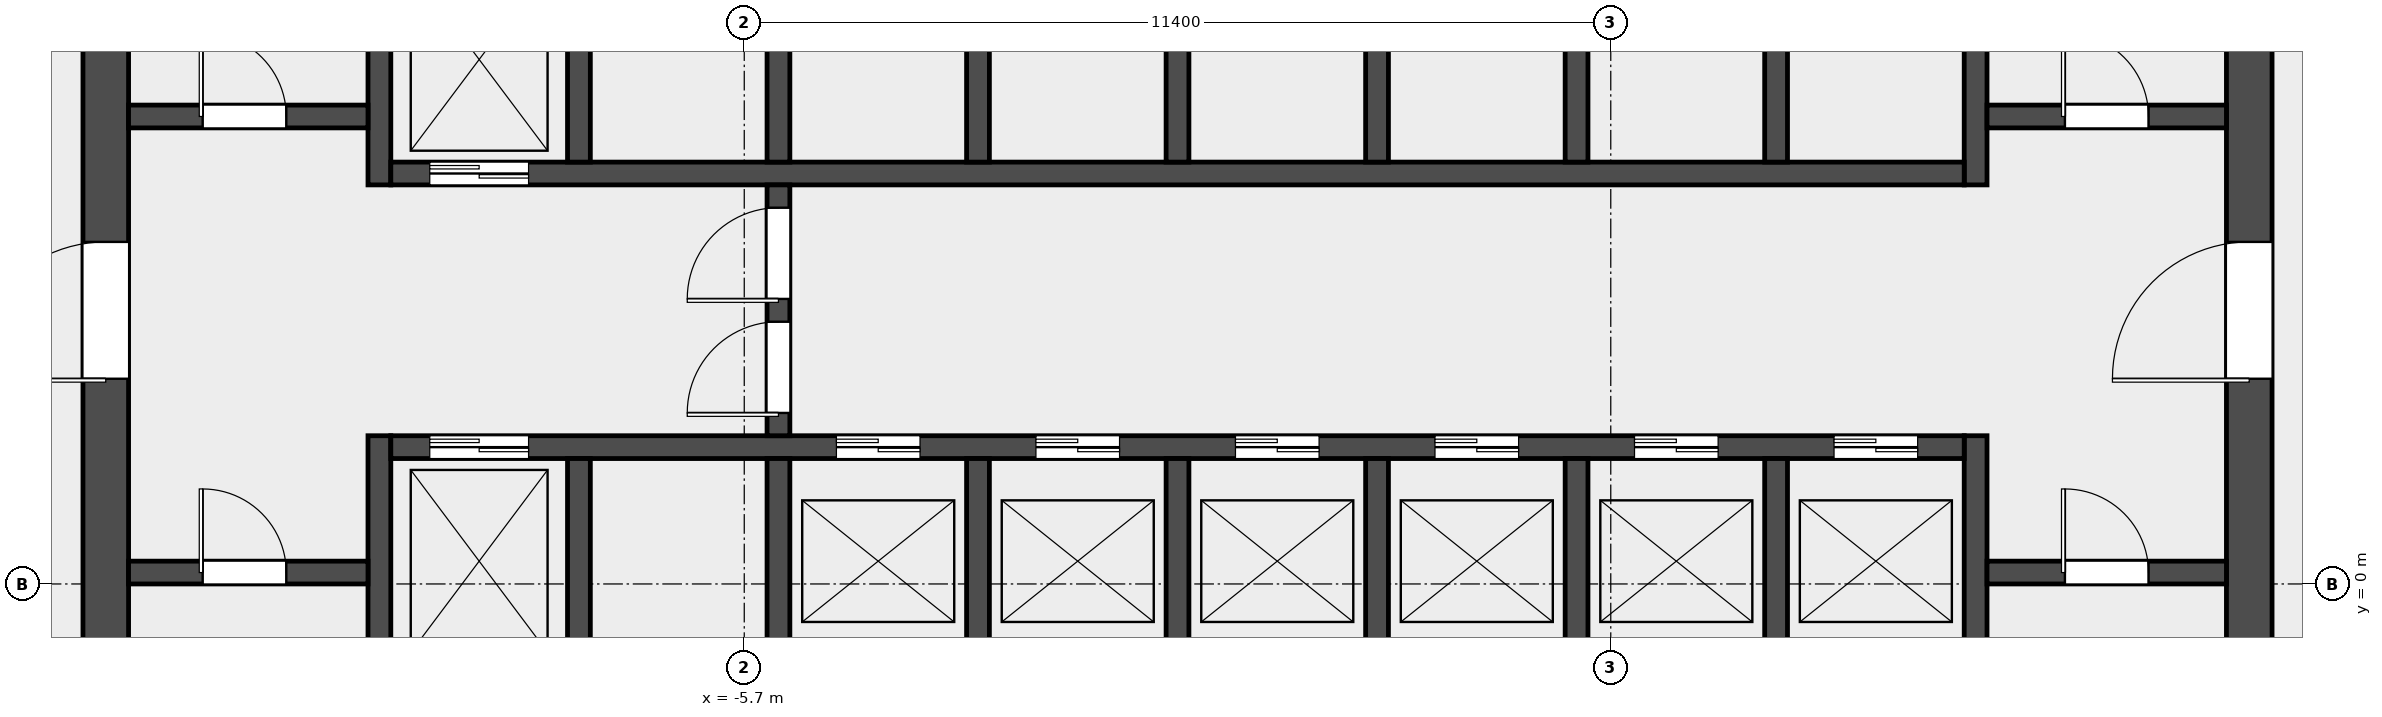
"""IFC4 building model, lengths in metres.
Left out: names, types, materials, properties, quantities, classifications, styles, units other than length and angle.
Written with IfcOpenShell. Run it as: python <this file> out.ifc"""

import sys

from ifc_helpers import new_model, si_unit, direction, frame, frame_2d, origin, place, context, subcontext, project, spatial, rectangle, extrude, element, fill, save


model = new_model("IFC4")
c1 = context("Model", 3, precision=1e-05, world=origin(), true_north=direction((0.0, 1.0)))
c2 = subcontext(c1, "Body", "Model", "MODEL_VIEW")
j1 = project(units=[si_unit("LENGTHUNIT", "METRE"), si_unit("PLANEANGLEUNIT", "RADIAN")], contexts=[c1])
p1 = place(None, origin())
s1 = spatial("IfcSite", under=j1, at=p1, CompositionType="ELEMENT")
p2 = place(p1, origin())
s2 = spatial("IfcBuilding", under=s1, at=p2, CompositionType="ELEMENT")
p3 = place(p2, frame((0.0, 0.0, 99.1)))
s3 = spatial("IfcBuildingStorey", under=s2, at=p3, CompositionType="ELEMENT", Elevation=99.1)
p4 = place(p3, frame((-14.1, -6.6, 0.0), z_axis=(0.0, 0.0, 1.0), x_axis=(0.0, 1.0, 0.0)))
e1 = element("IfcWall", 1, at=p4, inside=s3, PredefinedType="SHEAR", context=c2, shape_type="SweptSolid", body=[
    extrude(rectangle(XDim=19.5, YDim=0.6, at=frame_2d((9.75, 0.0))), origin(), (0.0, 0.0, 1.0), 4.2),
])
p5 = place(p4, frame((9.3, 0.0, 0.0)))
e2 = element("IfcOpeningElement", 2, at=p5, cuts=e1, PredefinedType="OPENING", context=c2, shape_type="SweptSolid", body=[
    extrude(rectangle(XDim=1.8, YDim=2.1, at=frame_2d((0.9, 1.05))), frame((0.0, 0.312, 0.0), z_axis=(0.0, -1.0, 0.0), x_axis=(1.0, 0.0, 0.0)), (0.0, 0.0, 1.0), 0.624),
])
p6 = place(p3, frame((14.1, -6.6, 0.0), z_axis=(0.0, 0.0, 1.0), x_axis=(0.0, 1.0, 0.0)))
e3 = element("IfcWall", 3, at=p6, inside=s3, PredefinedType="SHEAR", context=c2, shape_type="SweptSolid", body=[
    extrude(rectangle(XDim=19.5, YDim=0.6, at=frame_2d((9.75, 0.0))), origin(), (0.0, 0.0, 1.0), 4.2),
])
p7 = place(p6, frame((9.3, 0.0, 0.0)))
e4 = element("IfcOpeningElement", 4, at=p7, cuts=e3, PredefinedType="OPENING", context=c2, shape_type="SweptSolid", body=[
    extrude(rectangle(XDim=1.8, YDim=2.1, at=frame_2d((0.9, 1.05))), frame((0.0, 0.312, 0.0), z_axis=(0.0, -1.0, 0.0), x_axis=(1.0, 0.0, 0.0)), (0.0, 0.0, 1.0), 0.624),
])
p8 = place(p3, frame((-10.5, -6.6, 0.0), z_axis=(0.0, 0.0, 1.0), x_axis=(0.0, 1.0, 0.0)))
e5 = element("IfcWall", 5, at=p8, inside=s3, PredefinedType="SHEAR", context=c2, shape_type="SweptSolid", body=[
    extrude(rectangle(XDim=8.55, YDim=0.3, at=frame_2d((4.275, 0.0))), origin(), (0.0, 0.0, 1.0), 4.2),
])
p9 = place(p3, frame((-10.5, 5.25, 0.0), z_axis=(0.0, 0.0, 1.0), x_axis=(0.0, 1.0, 0.0)))
e6 = element("IfcWall", 6, at=p9, inside=s3, PredefinedType="SHEAR", context=c2, shape_type="SweptSolid", body=[
    extrude(rectangle(XDim=7.65, YDim=0.3, at=frame_2d((3.825, 0.0))), origin(), (0.0, 0.0, 1.0), 4.2),
])
p10 = place(p3, frame((10.5, -6.6, 0.0), z_axis=(0.0, 0.0, 1.0), x_axis=(0.0, 1.0, 0.0)))
e7 = element("IfcWall", 7, at=p10, inside=s3, PredefinedType="SHEAR", context=c2, shape_type="SweptSolid", body=[
    extrude(rectangle(XDim=8.55, YDim=0.3, at=frame_2d((4.275, 0.0))), origin(), (0.0, 0.0, 1.0), 4.2),
])
p11 = place(p3, frame((10.5, 5.25, 0.0), z_axis=(0.0, 0.0, 1.0), x_axis=(0.0, 1.0, 0.0)))
e8 = element("IfcWall", 8, at=p11, inside=s3, PredefinedType="SHEAR", context=c2, shape_type="SweptSolid", body=[
    extrude(rectangle(XDim=7.65, YDim=0.3, at=frame_2d((3.825, 0.0))), origin(), (0.0, 0.0, 1.0), 4.2),
])
p12 = place(p3, frame((-13.8, 0.15, 0.0), z_axis=(0.0, 0.0, 1.0), x_axis=(1.0, 0.0, 0.0)))
e9 = element("IfcWall", 9, at=p12, inside=s3, PredefinedType="SOLIDWALL", context=c2, shape_type="SweptSolid", body=[
    extrude(rectangle(XDim=3.15, YDim=0.3, at=frame_2d((1.575, 0.0))), origin(), (0.0, 0.0, 1.0), 4.2),
])
p13 = place(p12, frame((0.975, 0.0, 0.0)))
e10 = element("IfcOpeningElement", 10, at=p13, cuts=e9, PredefinedType="OPENING", context=c2, shape_type="SweptSolid", body=[
    extrude(rectangle(XDim=1.1, YDim=2.1, at=frame_2d((0.55, 1.05))), frame((0.0, 0.162, 0.0), z_axis=(0.0, -1.0, 0.0), x_axis=(1.0, 0.0, 0.0)), (0.0, 0.0, 1.0), 0.324),
])
p14 = place(p3, frame((-13.8, 6.15, 0.0), z_axis=(0.0, 0.0, 1.0), x_axis=(1.0, 0.0, 0.0)))
e11 = element("IfcWall", 11, at=p14, inside=s3, PredefinedType="SOLIDWALL", context=c2, shape_type="SweptSolid", body=[
    extrude(rectangle(XDim=3.15, YDim=0.3, at=frame_2d((1.575, 0.0))), origin(), (0.0, 0.0, 1.0), 4.2),
])
p15 = place(p14, frame((0.975, 0.0, 0.0)))
e12 = element("IfcOpeningElement", 12, at=p15, cuts=e11, PredefinedType="OPENING", context=c2, shape_type="SweptSolid", body=[
    extrude(rectangle(XDim=1.1, YDim=2.1, at=frame_2d((0.55, 1.05))), frame((0.0, 0.162, 0.0), z_axis=(0.0, -1.0, 0.0), x_axis=(1.0, 0.0, 0.0)), (0.0, 0.0, 1.0), 0.324),
])
p16 = place(p3, frame((10.65, 0.15, 0.0), z_axis=(0.0, 0.0, 1.0), x_axis=(1.0, 0.0, 0.0)))
e13 = element("IfcWall", 13, at=p16, inside=s3, PredefinedType="SOLIDWALL", context=c2, shape_type="SweptSolid", body=[
    extrude(rectangle(XDim=3.15, YDim=0.3, at=frame_2d((1.575, 0.0))), origin(), (0.0, 0.0, 1.0), 4.2),
])
p17 = place(p16, frame((1.025, 0.0, 0.0)))
e14 = element("IfcOpeningElement", 14, at=p17, cuts=e13, PredefinedType="OPENING", context=c2, shape_type="SweptSolid", body=[
    extrude(rectangle(XDim=1.1, YDim=2.1, at=frame_2d((0.55, 1.05))), frame((0.0, 0.162, 0.0), z_axis=(0.0, -1.0, 0.0), x_axis=(1.0, 0.0, 0.0)), (0.0, 0.0, 1.0), 0.324),
])
p18 = place(p3, frame((10.65, 6.15, 0.0), z_axis=(0.0, 0.0, 1.0), x_axis=(1.0, 0.0, 0.0)))
e15 = element("IfcWall", 15, at=p18, inside=s3, PredefinedType="SOLIDWALL", context=c2, shape_type="SweptSolid", body=[
    extrude(rectangle(XDim=3.15, YDim=0.3, at=frame_2d((1.575, 0.0))), origin(), (0.0, 0.0, 1.0), 4.2),
])
p19 = place(p18, frame((1.025, 0.0, 0.0)))
e16 = element("IfcOpeningElement", 16, at=p19, cuts=e15, PredefinedType="OPENING", context=c2, shape_type="SweptSolid", body=[
    extrude(rectangle(XDim=1.1, YDim=2.1, at=frame_2d((0.55, 1.05))), frame((0.0, 0.162, 0.0), z_axis=(0.0, -1.0, 0.0), x_axis=(1.0, 0.0, 0.0)), (0.0, 0.0, 1.0), 0.324),
])
p20 = place(p3, frame((-10.35, 1.8, 0.0), z_axis=(0.0, 0.0, 1.0), x_axis=(1.0, 0.0, 0.0)))
e17 = element("IfcWall", 17, at=p20, inside=s3, PredefinedType="SOLIDWALL", context=c2, shape_type="SweptSolid", body=[
    extrude(rectangle(XDim=20.7, YDim=0.3, at=frame_2d((10.35, 0.0))), origin(), (0.0, 0.0, 1.0), 4.2),
])
p21 = place(p20, frame((0.512, 0.0, 0.0)))
e18 = element("IfcOpeningElement", 18, at=p21, cuts=e17, PredefinedType="OPENING", context=c2, shape_type="SweptSolid", body=[
    extrude(rectangle(XDim=1.3, YDim=2.1, at=frame_2d((0.65, 1.05))), frame((0.0, 0.162, 0.0), z_axis=(0.0, -1.0, 0.0), x_axis=(1.0, 0.0, 0.0)), (0.0, 0.0, 1.0), 0.324),
])
p22 = place(p20, frame((5.863, 0.0, 0.0)))
e19 = element("IfcOpeningElement", 19, at=p22, cuts=e17, PredefinedType="OPENING", context=c2, shape_type="SweptSolid", body=[
    extrude(rectangle(XDim=1.1, YDim=2.1, at=frame_2d((0.55, 1.05))), frame((0.0, 0.162, 0.0), z_axis=(0.0, -1.0, 0.0), x_axis=(1.0, 0.0, 0.0)), (0.0, 0.0, 1.0), 0.324),
])
p23 = place(p20, frame((8.488, 0.0, 0.0)))
e20 = element("IfcOpeningElement", 20, at=p23, cuts=e17, PredefinedType="OPENING", context=c2, shape_type="SweptSolid", body=[
    extrude(rectangle(XDim=1.1, YDim=2.1, at=frame_2d((0.55, 1.05))), frame((0.0, 0.162, 0.0), z_axis=(0.0, -1.0, 0.0), x_axis=(1.0, 0.0, 0.0)), (0.0, 0.0, 1.0), 0.324),
])
p24 = place(p20, frame((11.113, 0.0, 0.0)))
e21 = element("IfcOpeningElement", 21, at=p24, cuts=e17, PredefinedType="OPENING", context=c2, shape_type="SweptSolid", body=[
    extrude(rectangle(XDim=1.1, YDim=2.1, at=frame_2d((0.55, 1.05))), frame((0.0, 0.162, 0.0), z_axis=(0.0, -1.0, 0.0), x_axis=(1.0, 0.0, 0.0)), (0.0, 0.0, 1.0), 0.324),
])
p25 = place(p20, frame((13.738, 0.0, 0.0)))
e22 = element("IfcOpeningElement", 22, at=p25, cuts=e17, PredefinedType="OPENING", context=c2, shape_type="SweptSolid", body=[
    extrude(rectangle(XDim=1.1, YDim=2.1, at=frame_2d((0.55, 1.05))), frame((0.0, 0.162, 0.0), z_axis=(0.0, -1.0, 0.0), x_axis=(1.0, 0.0, 0.0)), (0.0, 0.0, 1.0), 0.324),
])
p26 = place(p20, frame((16.363, 0.0, 0.0)))
e23 = element("IfcOpeningElement", 23, at=p26, cuts=e17, PredefinedType="OPENING", context=c2, shape_type="SweptSolid", body=[
    extrude(rectangle(XDim=1.1, YDim=2.1, at=frame_2d((0.55, 1.05))), frame((0.0, 0.162, 0.0), z_axis=(0.0, -1.0, 0.0), x_axis=(1.0, 0.0, 0.0)), (0.0, 0.0, 1.0), 0.324),
])
p27 = place(p20, frame((18.988, 0.0, 0.0)))
e24 = element("IfcOpeningElement", 24, at=p27, cuts=e17, PredefinedType="OPENING", context=c2, shape_type="SweptSolid", body=[
    extrude(rectangle(XDim=1.1, YDim=2.1, at=frame_2d((0.55, 1.05))), frame((0.0, 0.162, 0.0), z_axis=(0.0, -1.0, 0.0), x_axis=(1.0, 0.0, 0.0)), (0.0, 0.0, 1.0), 0.324),
])
p28 = place(p3, frame((-10.35, 5.4, 0.0), z_axis=(0.0, 0.0, 1.0), x_axis=(1.0, 0.0, 0.0)))
e25 = element("IfcWall", 25, at=p28, inside=s3, PredefinedType="SOLIDWALL", context=c2, shape_type="SweptSolid", body=[
    extrude(rectangle(XDim=20.7, YDim=0.3, at=frame_2d((10.35, 0.0))), origin(), (0.0, 0.0, 1.0), 4.2),
])
p29 = place(p28, frame((0.512, 0.0, 0.0)))
e26 = element("IfcOpeningElement", 26, at=p29, cuts=e25, PredefinedType="OPENING", context=c2, shape_type="SweptSolid", body=[
    extrude(rectangle(XDim=1.3, YDim=2.1, at=frame_2d((0.65, 1.05))), frame((0.0, 0.162, 0.0), z_axis=(0.0, -1.0, 0.0), x_axis=(1.0, 0.0, 0.0)), (0.0, 0.0, 1.0), 0.324),
])
for number, where, z_axis, x_axis in (
    (27, (-7.875, -1.05, 0.0), (0.0, 0.0, 1.0), (0.0, 1.0, 0.0)),
    (28, (-5.25, -1.05, 0.0), (0.0, 0.0, 1.0), (0.0, 1.0, 0.0)),
    (29, (-2.625, -1.05, 0.0), (0.0, 0.0, 1.0), (0.0, 1.0, 0.0)),
    (30, (0.0, -1.05, 0.0), (0.0, 0.0, 1.0), (0.0, 1.0, 0.0)),
    (31, (2.625, -1.05, 0.0), (0.0, 0.0, 1.0), (0.0, 1.0, 0.0)),
    (32, (5.25, -1.05, 0.0), (0.0, 0.0, 1.0), (0.0, 1.0, 0.0)),
    (33, (7.875, -1.05, 0.0), (0.0, 0.0, 1.0), (0.0, 1.0, 0.0)),
    (34, (-7.875, 5.55, 0.0), (0.0, 0.0, 1.0), (0.0, 1.0, 0.0)),
    (35, (-5.25, 5.55, 0.0), (0.0, 0.0, 1.0), (0.0, 1.0, 0.0)),
    (36, (-2.625, 5.55, 0.0), (0.0, 0.0, 1.0), (0.0, 1.0, 0.0)),
    (37, (0.0, 5.55, 0.0), (0.0, 0.0, 1.0), (0.0, 1.0, 0.0)),
    (38, (2.625, 5.55, 0.0), (0.0, 0.0, 1.0), (0.0, 1.0, 0.0)),
    (39, (5.25, 5.55, 0.0), (0.0, 0.0, 1.0), (0.0, 1.0, 0.0)),
    (40, (7.875, 5.55, 0.0), (0.0, 0.0, 1.0), (0.0, 1.0, 0.0)),
):
    element("IfcWall", number, at=place(p3, frame(where, z_axis=z_axis, x_axis=x_axis)), inside=s3, PredefinedType="SOLIDWALL", context=c2, shape_type="SweptSolid", body=[
        extrude(rectangle(XDim=2.7, YDim=0.3, at=frame_2d((1.35, 0.0))), origin(), (0.0, 0.0, 1.0), 4.2),
    ])
p30 = place(p3, frame((-5.25, 1.95, 0.0), z_axis=(0.0, 0.0, 1.0), x_axis=(0.0, 1.0, 0.0)))
e41 = element("IfcWall", 41, at=p30, inside=s3, PredefinedType="SOLIDWALL", context=c2, shape_type="SweptSolid", body=[
    extrude(rectangle(XDim=3.3, YDim=0.3, at=frame_2d((1.65, 0.0))), origin(), (0.0, 0.0, 1.0), 4.2),
])
p31 = place(p30, frame((0.3, 0.0, 0.0)))
e42 = element("IfcOpeningElement", 42, at=p31, cuts=e41, PredefinedType="OPENING", context=c2, shape_type="SweptSolid", body=[
    extrude(rectangle(XDim=1.2, YDim=2.1, at=frame_2d((0.6, 1.05))), frame((0.0, 0.162, 0.0), z_axis=(0.0, -1.0, 0.0), x_axis=(1.0, 0.0, 0.0)), (0.0, 0.0, 1.0), 0.324),
])
p32 = place(p30, frame((1.8, 0.0, 0.0)))
e43 = element("IfcOpeningElement", 43, at=p32, cuts=e41, PredefinedType="OPENING", context=c2, shape_type="SweptSolid", body=[
    extrude(rectangle(XDim=1.2, YDim=2.1, at=frame_2d((0.6, 1.05))), frame((0.0, 0.162, 0.0), z_axis=(0.0, -1.0, 0.0), x_axis=(1.0, 0.0, 0.0)), (0.0, 0.0, 1.0), 0.324),
])
p33 = place(p13, origin())
e44 = element("IfcDoor", 44, at=p33, inside=s3, OperationType="SINGLE_SWING_LEFT", PredefinedType="DOOR", context=c2, shape_type="SweptSolid", body=[
    extrude(rectangle(XDim=1.1, YDim=2.1, at=frame_2d((0.55, 1.05))), frame((0.0, 0.025, 0.0), z_axis=(0.0, -1.0, 0.0), x_axis=(1.0, 0.0, 0.0)), (0.0, 0.0, 1.0), 0.05),
])
fill(e10, e44)
p34 = place(p15, origin())
e45 = element("IfcDoor", 45, at=p34, inside=s3, OperationType="SINGLE_SWING_LEFT", PredefinedType="DOOR", context=c2, shape_type="SweptSolid", body=[
    extrude(rectangle(XDim=1.1, YDim=2.1, at=frame_2d((0.55, 1.05))), frame((0.0, 0.025, 0.0), z_axis=(0.0, -1.0, 0.0), x_axis=(1.0, 0.0, 0.0)), (0.0, 0.0, 1.0), 0.05),
])
fill(e12, e45)
p35 = place(p17, origin())
e46 = element("IfcDoor", 46, at=p35, inside=s3, OperationType="SINGLE_SWING_RIGHT", PredefinedType="DOOR", context=c2, shape_type="SweptSolid", body=[
    extrude(rectangle(XDim=1.1, YDim=2.1, at=frame_2d((0.55, 1.05))), frame((0.0, 0.025, 0.0), z_axis=(0.0, -1.0, 0.0), x_axis=(1.0, 0.0, 0.0)), (0.0, 0.0, 1.0), 0.05),
])
fill(e14, e46)
p36 = place(p19, origin())
e47 = element("IfcDoor", 47, at=p36, inside=s3, OperationType="SINGLE_SWING_RIGHT", PredefinedType="DOOR", context=c2, shape_type="SweptSolid", body=[
    extrude(rectangle(XDim=1.1, YDim=2.1, at=frame_2d((0.55, 1.05))), frame((0.0, 0.025, 0.0), z_axis=(0.0, -1.0, 0.0), x_axis=(1.0, 0.0, 0.0)), (0.0, 0.0, 1.0), 0.05),
])
fill(e16, e47)
p37 = place(p5, origin())
e48 = element("IfcDoor", 48, at=p37, inside=s3, OperationType="DOUBLE_DOOR_SINGLE_SWING", PredefinedType="DOOR", context=c2, shape_type="SweptSolid", body=[
    extrude(rectangle(XDim=1.8, YDim=2.1, at=frame_2d((0.9, 1.05))), frame((0.0, 0.025, 0.0), z_axis=(0.0, -1.0, 0.0), x_axis=(1.0, 0.0, 0.0)), (0.0, 0.0, 1.0), 0.05),
])
fill(e2, e48)
p38 = place(p7, origin())
e49 = element("IfcDoor", 49, at=p38, inside=s3, OperationType="DOUBLE_DOOR_SINGLE_SWING", PredefinedType="DOOR", context=c2, shape_type="SweptSolid", body=[
    extrude(rectangle(XDim=1.8, YDim=2.1, at=frame_2d((0.9, 1.05))), frame((0.0, 0.025, 0.0), z_axis=(0.0, -1.0, 0.0), x_axis=(1.0, 0.0, 0.0)), (0.0, 0.0, 1.0), 0.05),
])
fill(e4, e49)
p39 = place(p31, origin())
e50 = element("IfcDoor", 50, at=p39, inside=s3, OperationType="SINGLE_SWING_LEFT", PredefinedType="DOOR", context=c2, shape_type="SweptSolid", body=[
    extrude(rectangle(XDim=1.2, YDim=2.1, at=frame_2d((0.6, 1.05))), frame((0.0, 0.025, 0.0), z_axis=(0.0, -1.0, 0.0), x_axis=(1.0, 0.0, 0.0)), (0.0, 0.0, 1.0), 0.05),
])
fill(e42, e50)
p40 = place(p32, origin())
e51 = element("IfcDoor", 51, at=p40, inside=s3, OperationType="SINGLE_SWING_RIGHT", PredefinedType="DOOR", context=c2, shape_type="SweptSolid", body=[
    extrude(rectangle(XDim=1.2, YDim=2.1, at=frame_2d((0.6, 1.05))), frame((0.0, 0.025, 0.0), z_axis=(0.0, -1.0, 0.0), x_axis=(1.0, 0.0, 0.0)), (0.0, 0.0, 1.0), 0.05),
])
fill(e43, e51)
p41 = place(p21, origin())
e52 = element("IfcDoor", 52, at=p41, inside=s3, OperationType="DOUBLE_DOOR_SLIDING", PredefinedType="DOOR", context=c2, shape_type="SweptSolid", body=[
    extrude(rectangle(XDim=1.3, YDim=2.1, at=frame_2d((0.65, 1.05))), frame((0.0, 0.025, 0.0), z_axis=(0.0, -1.0, 0.0), x_axis=(1.0, 0.0, 0.0)), (0.0, 0.0, 1.0), 0.05),
])
fill(e18, e52)
p42 = place(p22, origin())
e53 = element("IfcDoor", 53, at=p42, inside=s3, OperationType="DOUBLE_DOOR_SLIDING", PredefinedType="DOOR", context=c2, shape_type="SweptSolid", body=[
    extrude(rectangle(XDim=1.1, YDim=2.1, at=frame_2d((0.55, 1.05))), frame((0.0, 0.025, 0.0), z_axis=(0.0, -1.0, 0.0), x_axis=(1.0, 0.0, 0.0)), (0.0, 0.0, 1.0), 0.05),
])
fill(e19, e53)
p43 = place(p23, origin())
e54 = element("IfcDoor", 54, at=p43, inside=s3, OperationType="DOUBLE_DOOR_SLIDING", PredefinedType="DOOR", context=c2, shape_type="SweptSolid", body=[
    extrude(rectangle(XDim=1.1, YDim=2.1, at=frame_2d((0.55, 1.05))), frame((0.0, 0.025, 0.0), z_axis=(0.0, -1.0, 0.0), x_axis=(1.0, 0.0, 0.0)), (0.0, 0.0, 1.0), 0.05),
])
fill(e20, e54)
p44 = place(p24, origin())
e55 = element("IfcDoor", 55, at=p44, inside=s3, OperationType="DOUBLE_DOOR_SLIDING", PredefinedType="DOOR", context=c2, shape_type="SweptSolid", body=[
    extrude(rectangle(XDim=1.1, YDim=2.1, at=frame_2d((0.55, 1.05))), frame((0.0, 0.025, 0.0), z_axis=(0.0, -1.0, 0.0), x_axis=(1.0, 0.0, 0.0)), (0.0, 0.0, 1.0), 0.05),
])
fill(e21, e55)
p45 = place(p25, origin())
e56 = element("IfcDoor", 56, at=p45, inside=s3, OperationType="DOUBLE_DOOR_SLIDING", PredefinedType="DOOR", context=c2, shape_type="SweptSolid", body=[
    extrude(rectangle(XDim=1.1, YDim=2.1, at=frame_2d((0.55, 1.05))), frame((0.0, 0.025, 0.0), z_axis=(0.0, -1.0, 0.0), x_axis=(1.0, 0.0, 0.0)), (0.0, 0.0, 1.0), 0.05),
])
fill(e22, e56)
p46 = place(p26, origin())
e57 = element("IfcDoor", 57, at=p46, inside=s3, OperationType="DOUBLE_DOOR_SLIDING", PredefinedType="DOOR", context=c2, shape_type="SweptSolid", body=[
    extrude(rectangle(XDim=1.1, YDim=2.1, at=frame_2d((0.55, 1.05))), frame((0.0, 0.025, 0.0), z_axis=(0.0, -1.0, 0.0), x_axis=(1.0, 0.0, 0.0)), (0.0, 0.0, 1.0), 0.05),
])
fill(e23, e57)
p47 = place(p27, origin())
e58 = element("IfcDoor", 58, at=p47, inside=s3, OperationType="DOUBLE_DOOR_SLIDING", PredefinedType="DOOR", context=c2, shape_type="SweptSolid", body=[
    extrude(rectangle(XDim=1.1, YDim=2.1, at=frame_2d((0.55, 1.05))), frame((0.0, 0.025, 0.0), z_axis=(0.0, -1.0, 0.0), x_axis=(1.0, 0.0, 0.0)), (0.0, 0.0, 1.0), 0.05),
])
fill(e24, e58)
p48 = place(p29, origin())
e59 = element("IfcDoor", 59, at=p48, inside=s3, OperationType="DOUBLE_DOOR_SLIDING", PredefinedType="DOOR", context=c2, shape_type="SweptSolid", body=[
    extrude(rectangle(XDim=1.3, YDim=2.1, at=frame_2d((0.65, 1.05))), frame((0.0, 0.025, 0.0), z_axis=(0.0, -1.0, 0.0), x_axis=(1.0, 0.0, 0.0)), (0.0, 0.0, 1.0), 0.05),
])
fill(e26, e59)
save(model, sys.argv[1])
